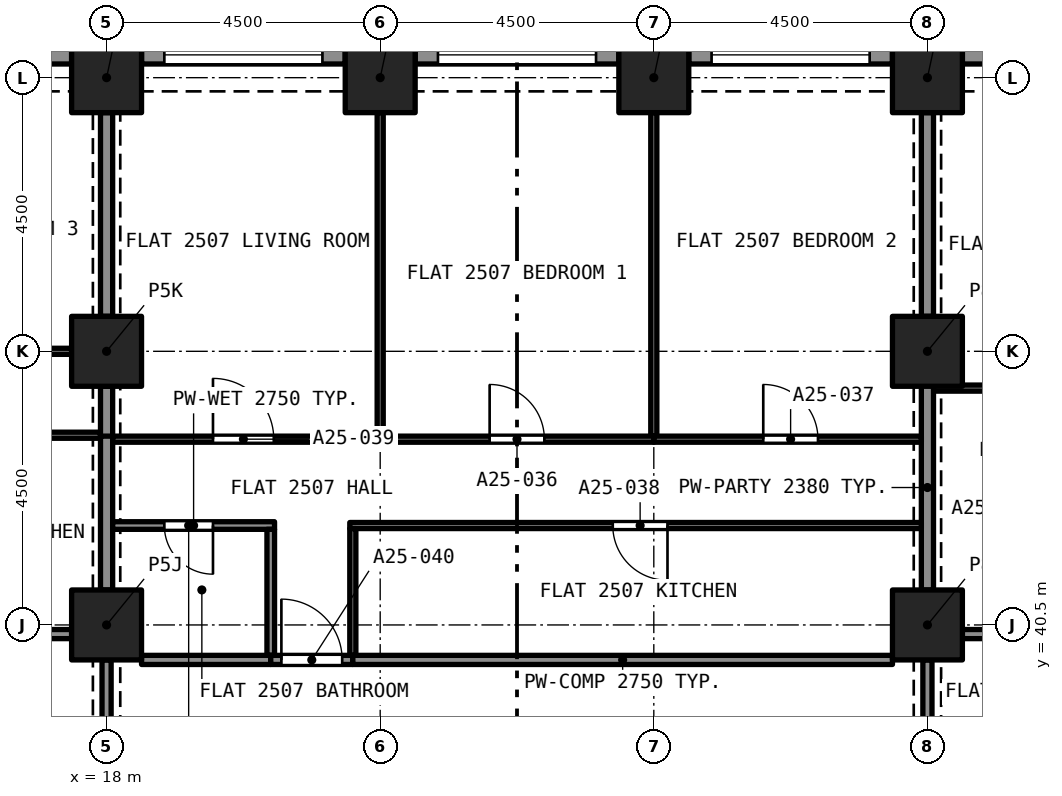
"""IFC4 building model, lengths in metres.
Left out: names, types, materials, properties, quantities, classifications, styles, units other than length and angle.
Written with IfcOpenShell. Run it as: python <this file> out.ifc"""

import sys

from ifc_helpers import new_model, si_unit, direction, frame, frame_2d, origin, origin_2d, place, context, subcontext, project, spatial, rectangle, extrude, element, fill, save


model = new_model("IFC4")
c1 = context("Model", 3, precision=1e-05, world=origin(), true_north=direction((0.0, 1.0)))
c2 = subcontext(c1, "Body", "Model", "MODEL_VIEW")
j1 = project(units=[si_unit("LENGTHUNIT", "METRE"), si_unit("PLANEANGLEUNIT", "RADIAN")], contexts=[c1])
p1 = place(None, origin())
s1 = spatial("IfcSite", under=j1, at=p1, CompositionType="ELEMENT")
p2 = place(p1, origin())
s2 = spatial("IfcBuilding", under=s1, at=p2, CompositionType="ELEMENT")
p3 = place(p2, frame((0.0, 0.0, 92.8)))
s3 = spatial("IfcBuildingStorey", under=s2, at=p3, CompositionType="ELEMENT", Elevation=92.8)
for number, where, z_axis, x_axis in (
    (1, (18.0, 40.5, 0.0), (0.0, 0.0, 1.0), (1.0, 0.0, 0.0)),
    (2, (31.5, 40.5, 0.0), (0.0, 0.0, 1.0), (1.0, 0.0, 0.0)),
    (3, (18.0, 45.0, 0.0), (0.0, 0.0, 1.0), (1.0, 0.0, 0.0)),
    (4, (31.5, 45.0, 0.0), (0.0, 0.0, 1.0), (1.0, 0.0, 0.0)),
    (5, (18.0, 49.5, 0.0), (0.0, 0.0, 1.0), (1.0, 0.0, 0.0)),
    (6, (22.5, 49.5, 0.0), (0.0, 0.0, 1.0), (1.0, 0.0, 0.0)),
    (7, (27.0, 49.5, 0.0), (0.0, 0.0, 1.0), (1.0, 0.0, 0.0)),
    (8, (31.5, 49.5, 0.0), (0.0, 0.0, 1.0), (1.0, 0.0, 0.0)),
):
    element("IfcColumn", number, at=place(p3, frame(where, z_axis=z_axis, x_axis=x_axis)), inside=s3, PredefinedType="COLUMN", context=c2, shape_type="SweptSolid", body=[
        extrude(rectangle(XDim=1.15, YDim=1.15, at=origin_2d()), origin(), (0.0, 0.0, 1.0), 3.2),
    ])
p4 = place(p3, frame((32.075, 49.875, 0.0), z_axis=(0.0, 0.0, 1.0), x_axis=(1.0, 0.0, 0.0)))
e9 = element("IfcWall", 9, at=p4, inside=s3, PredefinedType="SOLIDWALL", context=c2, shape_type="SweptSolid", body=[
    extrude(rectangle(XDim=3.35, YDim=0.3, at=frame_2d((1.675, 0.0))), origin(), (0.0, 0.0, 1.0), 3.2),
])
p5 = place(p4, frame((0.375, 0.0, 0.45)))
e10 = element("IfcOpeningElement", 10, at=p5, cuts=e9, PredefinedType="OPENING", context=c2, shape_type="SweptSolid", body=[
    extrude(rectangle(XDim=2.6, YDim=1.95, at=frame_2d((1.3, 0.975))), frame((0.0, 0.16, 0.0), z_axis=(0.0, -1.0, 0.0), x_axis=(1.0, 0.0, 0.0)), (0.0, 0.0, 1.0), 0.32),
])
p6 = place(p3, frame((27.575, 49.875, 0.0), z_axis=(0.0, 0.0, 1.0), x_axis=(1.0, 0.0, 0.0)))
e11 = element("IfcWall", 11, at=p6, inside=s3, PredefinedType="SOLIDWALL", context=c2, shape_type="SweptSolid", body=[
    extrude(rectangle(XDim=3.35, YDim=0.3, at=frame_2d((1.675, 0.0))), origin(), (0.0, 0.0, 1.0), 3.2),
])
p7 = place(p6, frame((0.375, 0.0, 0.45)))
e12 = element("IfcOpeningElement", 12, at=p7, cuts=e11, PredefinedType="OPENING", context=c2, shape_type="SweptSolid", body=[
    extrude(rectangle(XDim=2.6, YDim=1.95, at=frame_2d((1.3, 0.975))), frame((0.0, 0.16, 0.0), z_axis=(0.0, -1.0, 0.0), x_axis=(1.0, 0.0, 0.0)), (0.0, 0.0, 1.0), 0.32),
])
p8 = place(p3, frame((23.075, 49.875, 0.0), z_axis=(0.0, 0.0, 1.0), x_axis=(1.0, 0.0, 0.0)))
e13 = element("IfcWall", 13, at=p8, inside=s3, PredefinedType="SOLIDWALL", context=c2, shape_type="SweptSolid", body=[
    extrude(rectangle(XDim=3.35, YDim=0.3, at=frame_2d((1.675, 0.0))), origin(), (0.0, 0.0, 1.0), 3.2),
])
p9 = place(p8, frame((0.375, 0.0, 0.45)))
e14 = element("IfcOpeningElement", 14, at=p9, cuts=e13, PredefinedType="OPENING", context=c2, shape_type="SweptSolid", body=[
    extrude(rectangle(XDim=2.6, YDim=1.95, at=frame_2d((1.3, 0.975))), frame((0.0, 0.16, 0.0), z_axis=(0.0, -1.0, 0.0), x_axis=(1.0, 0.0, 0.0)), (0.0, 0.0, 1.0), 0.32),
])
p10 = place(p3, frame((18.575, 49.875, 0.0), z_axis=(0.0, 0.0, 1.0), x_axis=(1.0, 0.0, 0.0)))
e15 = element("IfcWall", 15, at=p10, inside=s3, PredefinedType="SOLIDWALL", context=c2, shape_type="SweptSolid", body=[
    extrude(rectangle(XDim=3.35, YDim=0.3, at=frame_2d((1.675, 0.0))), origin(), (0.0, 0.0, 1.0), 3.2),
])
p11 = place(p10, frame((0.375, 0.0, 0.45)))
e16 = element("IfcOpeningElement", 16, at=p11, cuts=e15, PredefinedType="OPENING", context=c2, shape_type="SweptSolid", body=[
    extrude(rectangle(XDim=2.6, YDim=1.95, at=frame_2d((1.3, 0.975))), frame((0.0, 0.16, 0.0), z_axis=(0.0, -1.0, 0.0), x_axis=(1.0, 0.0, 0.0)), (0.0, 0.0, 1.0), 0.32),
])
p12 = place(p3, frame((14.075, 49.875, 0.0), z_axis=(0.0, 0.0, 1.0), x_axis=(1.0, 0.0, 0.0)))
e17 = element("IfcWall", 17, at=p12, inside=s3, PredefinedType="SOLIDWALL", context=c2, shape_type="SweptSolid", body=[
    extrude(rectangle(XDim=3.35, YDim=0.3, at=frame_2d((1.675, 0.0))), origin(), (0.0, 0.0, 1.0), 3.2),
])
p13 = place(p12, frame((0.375, 0.0, 0.45)))
e18 = element("IfcOpeningElement", 18, at=p13, cuts=e17, PredefinedType="OPENING", context=c2, shape_type="SweptSolid", body=[
    extrude(rectangle(XDim=2.6, YDim=1.95, at=frame_2d((1.3, 0.975))), frame((0.0, 0.16, 0.0), z_axis=(0.0, -1.0, 0.0), x_axis=(1.0, 0.0, 0.0)), (0.0, 0.0, 1.0), 0.32),
])
p14 = place(p3, frame((13.5, 45.0, 0.0), z_axis=(0.0, 0.0, 1.0), x_axis=(1.0, 0.0, 0.0)))
e19 = element("IfcWall", 19, at=p14, inside=s3, PredefinedType="PARTITIONING", context=c2, shape_type="SweptSolid", body=[
    extrude(rectangle(XDim=3.925, YDim=0.1, at=frame_2d((1.962, 0.0))), origin(), (0.0, 0.0, 1.0), 2.9),
])
p15 = place(p14, frame((1.8, 0.0, 0.0)))
e20 = element("IfcOpeningElement", 20, at=p15, cuts=e19, PredefinedType="OPENING", context=c2, shape_type="SweptSolid", body=[
    extrude(rectangle(XDim=0.9, YDim=2.1, at=frame_2d((0.45, 1.05))), frame((0.0, 0.06, 0.0), z_axis=(0.0, -1.0, 0.0), x_axis=(1.0, 0.0, 0.0)), (0.0, 0.0, 1.0), 0.12),
])
p16 = place(p3, frame((18.0, 45.575, 0.0), z_axis=(0.0, 0.0, 1.0), x_axis=(0.0, 1.0, 0.0)))
e21 = element("IfcWall", 21, at=p16, inside=s3, PredefinedType="PARTITIONING", context=c2, shape_type="SweptSolid", body=[
    extrude(rectangle(XDim=3.35, YDim=0.2, at=frame_2d((1.675, 0.0))), origin(), (0.0, 0.0, 1.0), 2.38),
])
p17 = place(p3, frame((17.9, 43.62, 0.0), z_axis=(0.0, 0.0, 1.0), x_axis=(-1.0, 0.0, 0.0)))
e22 = element("IfcWall", 22, at=p17, inside=s3, PredefinedType="PARTITIONING", context=c2, shape_type="SweptSolid", body=[
    extrude(rectangle(XDim=6.172, YDim=0.1, at=frame_2d((3.086, 0.0))), origin(), (0.0, 0.0, 1.0), 2.9),
])
p18 = place(p17, frame((2.586, 0.0, 0.0)))
e23 = element("IfcOpeningElement", 23, at=p18, cuts=e22, PredefinedType="OPENING", context=c2, shape_type="SweptSolid", body=[
    extrude(rectangle(XDim=0.9, YDim=2.1, at=frame_2d((0.45, 1.05))), frame((0.0, 0.06, 0.0), z_axis=(0.0, -1.0, 0.0), x_axis=(1.0, 0.0, 0.0)), (0.0, 0.0, 1.0), 0.12),
])
p19 = place(p3, frame((18.0, 43.57, 0.0), z_axis=(0.0, 0.0, 1.0), x_axis=(0.0, 1.0, 0.0)))
e24 = element("IfcWall", 24, at=p19, inside=s3, PredefinedType="PARTITIONING", context=c2, shape_type="SweptSolid", body=[
    extrude(rectangle(XDim=0.855, YDim=0.2, at=frame_2d((0.427, 0.0))), origin(), (0.0, 0.0, 1.0), 2.38),
])
p20 = place(p3, frame((18.0, 41.075, 0.0), z_axis=(0.0, 0.0, 1.0), x_axis=(0.0, 1.0, 0.0)))
e25 = element("IfcWall", 25, at=p20, inside=s3, PredefinedType="PARTITIONING", context=c2, shape_type="SweptSolid", body=[
    extrude(rectangle(XDim=2.53, YDim=0.2, at=frame_2d((1.265, 0.0))), origin(), (0.0, 0.0, 1.0), 2.38),
])
p21 = place(p3, frame((13.35, 40.35, 0.0), z_axis=(0.0, 0.0, 1.0), x_axis=(1.0, 0.0, 0.0)))
e26 = element("IfcWall", 26, at=p21, inside=s3, PredefinedType="PARTITIONING", context=c2, shape_type="SweptSolid", body=[
    extrude(rectangle(XDim=4.075, YDim=0.15, at=frame_2d((2.038, 0.0))), origin(), (0.0, 0.0, 1.0), 2.9),
])
p22 = place(p3, frame((31.6, 44.395, 0.0), z_axis=(0.0, 0.0, 1.0), x_axis=(1.0, 0.0, 0.0)))
e27 = element("IfcWall", 27, at=p22, inside=s3, PredefinedType="PARTITIONING", context=c2, shape_type="SweptSolid", body=[
    extrude(rectangle(XDim=4.4, YDim=0.1, at=frame_2d((2.2, 0.0))), origin(), (0.0, 0.0, 1.0), 2.9),
])
p23 = place(p22, frame((1.65, 0.0, 0.0)))
e28 = element("IfcOpeningElement", 28, at=p23, cuts=e27, PredefinedType="OPENING", context=c2, shape_type="SweptSolid", body=[
    extrude(rectangle(XDim=1.0, YDim=2.1, at=frame_2d((0.5, 1.05))), frame((0.0, 0.06, 0.0), z_axis=(0.0, -1.0, 0.0), x_axis=(1.0, 0.0, 0.0)), (0.0, 0.0, 1.0), 0.12),
])
p24 = place(p3, frame((31.5, 41.075, 0.0), z_axis=(0.0, 0.0, 1.0), x_axis=(0.0, 1.0, 0.0)))
e29 = element("IfcWall", 29, at=p24, inside=s3, PredefinedType="PARTITIONING", context=c2, shape_type="SweptSolid", body=[
    extrude(rectangle(XDim=3.37, YDim=0.2, at=frame_2d((1.685, 0.0))), origin(), (0.0, 0.0, 1.0), 2.38),
])
p25 = place(p3, frame((32.075, 40.35, 0.0), z_axis=(0.0, 0.0, 1.0), x_axis=(1.0, 0.0, 0.0)))
e30 = element("IfcWall", 30, at=p25, inside=s3, PredefinedType="PARTITIONING", context=c2, shape_type="SweptSolid", body=[
    extrude(rectangle(XDim=2.35, YDim=0.15, at=frame_2d((1.175, 0.0))), origin(), (0.0, 0.0, 1.0), 2.9),
])
p26 = place(p25, frame((1.175, 0.0, 0.0)))
e31 = element("IfcOpeningElement", 31, at=p26, cuts=e30, PredefinedType="OPENING", context=c2, shape_type="SweptSolid", body=[
    extrude(rectangle(XDim=1.0, YDim=2.1, at=frame_2d((0.5, 1.05))), frame((0.0, 0.085, 0.0), z_axis=(0.0, -1.0, 0.0), x_axis=(1.0, 0.0, 0.0)), (0.0, 0.0, 1.0), 0.17),
])
p27 = place(p3, frame((31.5, 45.575, 0.0), z_axis=(0.0, 0.0, 1.0), x_axis=(0.0, 1.0, 0.0)))
e32 = element("IfcWall", 32, at=p27, inside=s3, PredefinedType="PARTITIONING", context=c2, shape_type="SweptSolid", body=[
    extrude(rectangle(XDim=3.35, YDim=0.2, at=frame_2d((1.675, 0.0))), origin(), (0.0, 0.0, 1.0), 2.38),
])
p28 = place(p3, frame((20.762, 42.135, 0.0), z_axis=(0.0, 0.0, 1.0), x_axis=(-1.0, 0.0, 0.0)))
e33 = element("IfcWall", 33, at=p28, inside=s3, PredefinedType="PARTITIONING", context=c2, shape_type="SweptSolid", body=[
    extrude(rectangle(XDim=2.662, YDim=0.125, at=frame_2d((1.331, 0.0))), origin(), (0.0, 0.0, 1.0), 2.75),
])
p29 = place(p28, frame((1.012, 0.0, 0.0)))
e34 = element("IfcOpeningElement", 34, at=p29, cuts=e33, PredefinedType="OPENING", context=c2, shape_type="SweptSolid", body=[
    extrude(rectangle(XDim=0.8, YDim=2.1, at=frame_2d((0.4, 1.05))), frame((0.0, 0.073, 0.0), z_axis=(0.0, -1.0, 0.0), x_axis=(1.0, 0.0, 0.0)), (0.0, 0.0, 1.0), 0.145),
])
p30 = place(p3, frame((20.7, 40.0, 0.0), z_axis=(0.0, 0.0, 1.0), x_axis=(0.0, 1.0, 0.0)))
e35 = element("IfcWall", 35, at=p30, inside=s3, PredefinedType="PARTITIONING", context=c2, shape_type="SweptSolid", body=[
    extrude(rectangle(XDim=2.073, YDim=0.125, at=frame_2d((1.036, 0.0))), origin(), (0.0, 0.0, 1.0), 2.75),
])
p31 = place(p3, frame((18.575, 39.925, 0.0), z_axis=(0.0, 0.0, 1.0), x_axis=(1.0, 0.0, 0.0)))
e36 = element("IfcWall", 36, at=p31, inside=s3, PredefinedType="PARTITIONING", context=c2, shape_type="SweptSolid", body=[
    extrude(rectangle(XDim=2.125, YDim=0.15, at=frame_2d((1.062, 0.0))), origin(), (0.0, 0.0, 1.0), 2.75),
])
p32 = place(p3, frame((27.0, 43.605, 0.0), z_axis=(0.0, 0.0, 1.0), x_axis=(0.0, 1.0, 0.0)))
e37 = element("IfcWall", 37, at=p32, inside=s3, PredefinedType="PARTITIONING", context=c2, shape_type="SweptSolid", body=[
    extrude(rectangle(XDim=5.32, YDim=0.1, at=frame_2d((2.66, 0.0))), origin(), (0.0, 0.0, 1.0), 2.75),
])
p33 = place(p3, frame((22.5, 43.555, 0.0), z_axis=(0.0, 0.0, 1.0), x_axis=(1.0, 0.0, 0.0)))
e38 = element("IfcWall", 38, at=p33, inside=s3, PredefinedType="PARTITIONING", context=c2, shape_type="SweptSolid", body=[
    extrude(rectangle(XDim=4.5, YDim=0.1, at=frame_2d((2.25, 0.0))), origin(), (0.0, 0.0, 1.0), 2.75),
])
p34 = place(p33, frame((1.8, 0.0, 0.0)))
e39 = element("IfcOpeningElement", 39, at=p34, cuts=e38, PredefinedType="OPENING", context=c2, shape_type="SweptSolid", body=[
    extrude(rectangle(XDim=0.9, YDim=2.1, at=frame_2d((0.45, 1.05))), frame((0.0, 0.06, 0.0), z_axis=(0.0, -1.0, 0.0), x_axis=(1.0, 0.0, 0.0)), (0.0, 0.0, 1.0), 0.12),
])
p35 = place(p3, frame((22.5, 43.605, 0.0), z_axis=(0.0, 0.0, 1.0), x_axis=(0.0, 1.0, 0.0)))
e40 = element("IfcWall", 40, at=p35, inside=s3, PredefinedType="PARTITIONING", context=c2, shape_type="SweptSolid", body=[
    extrude(rectangle(XDim=5.32, YDim=0.1, at=frame_2d((2.66, 0.0))), origin(), (0.0, 0.0, 1.0), 2.75),
])
p36 = place(p3, frame((27.0, 43.555, 0.0), z_axis=(0.0, 0.0, 1.0), x_axis=(1.0, 0.0, 0.0)))
e41 = element("IfcWall", 41, at=p36, inside=s3, PredefinedType="PARTITIONING", context=c2, shape_type="SweptSolid", body=[
    extrude(rectangle(XDim=4.4, YDim=0.1, at=frame_2d((2.2, 0.0))), origin(), (0.0, 0.0, 1.0), 2.75),
])
p37 = place(p36, frame((1.8, 0.0, 0.0)))
e42 = element("IfcOpeningElement", 42, at=p37, cuts=e41, PredefinedType="OPENING", context=c2, shape_type="SweptSolid", body=[
    extrude(rectangle(XDim=0.9, YDim=2.1, at=frame_2d((0.45, 1.05))), frame((0.0, 0.06, 0.0), z_axis=(0.0, -1.0, 0.0), x_axis=(1.0, 0.0, 0.0)), (0.0, 0.0, 1.0), 0.12),
])
p38 = place(p3, frame((31.4, 42.135, 0.0), z_axis=(0.0, 0.0, 1.0), x_axis=(-1.0, 0.0, 0.0)))
e43 = element("IfcWall", 43, at=p38, inside=s3, PredefinedType="PARTITIONING", context=c2, shape_type="SweptSolid", body=[
    extrude(rectangle(XDim=9.4, YDim=0.1, at=frame_2d((4.7, 0.0))), origin(), (0.0, 0.0, 1.0), 2.75),
])
p39 = place(p38, frame((4.175, 0.0, 0.0)))
e44 = element("IfcOpeningElement", 44, at=p39, cuts=e43, PredefinedType="OPENING", context=c2, shape_type="SweptSolid", body=[
    extrude(rectangle(XDim=0.9, YDim=2.1, at=frame_2d((0.45, 1.05))), frame((0.0, 0.06, 0.0), z_axis=(0.0, -1.0, 0.0), x_axis=(1.0, 0.0, 0.0)), (0.0, 0.0, 1.0), 0.12),
])
p40 = place(p3, frame((22.05, 40.0, 0.0), z_axis=(0.0, 0.0, 1.0), x_axis=(0.0, 1.0, 0.0)))
e45 = element("IfcWall", 45, at=p40, inside=s3, PredefinedType="PARTITIONING", context=c2, shape_type="SweptSolid", body=[
    extrude(rectangle(XDim=2.085, YDim=0.1, at=frame_2d((1.042, 0.0))), origin(), (0.0, 0.0, 1.0), 2.75),
])
p41 = place(p3, frame((18.1, 43.555, 0.0), z_axis=(0.0, 0.0, 1.0), x_axis=(1.0, 0.0, 0.0)))
e46 = element("IfcWall", 46, at=p41, inside=s3, PredefinedType="PARTITIONING", context=c2, shape_type="SweptSolid", body=[
    extrude(rectangle(XDim=4.4, YDim=0.1, at=frame_2d((2.2, 0.0))), origin(), (0.0, 0.0, 1.0), 2.75),
])
p42 = place(p41, frame((1.65, 0.0, 0.0)))
e47 = element("IfcOpeningElement", 47, at=p42, cuts=e46, PredefinedType="OPENING", context=c2, shape_type="SweptSolid", body=[
    extrude(rectangle(XDim=1.0, YDim=2.1, at=frame_2d((0.5, 1.05))), frame((0.0, 0.06, 0.0), z_axis=(0.0, -1.0, 0.0), x_axis=(1.0, 0.0, 0.0)), (0.0, 0.0, 1.0), 0.12),
])
p43 = place(p3, frame((20.7, 39.925, 0.0), z_axis=(0.0, 0.0, 1.0), x_axis=(1.0, 0.0, 0.0)))
e48 = element("IfcWall", 48, at=p43, inside=s3, PredefinedType="PARTITIONING", context=c2, shape_type="SweptSolid", body=[
    extrude(rectangle(XDim=1.35, YDim=0.15, at=frame_2d((0.675, 0.0))), origin(), (0.0, 0.0, 1.0), 2.75),
])
p44 = place(p43, frame((0.175, 0.0, 0.0)))
e49 = element("IfcOpeningElement", 49, at=p44, cuts=e48, PredefinedType="OPENING", context=c2, shape_type="SweptSolid", body=[
    extrude(rectangle(XDim=1.0, YDim=2.1, at=frame_2d((0.5, 1.05))), frame((0.0, 0.085, 0.0), z_axis=(0.0, -1.0, 0.0), x_axis=(1.0, 0.0, 0.0)), (0.0, 0.0, 1.0), 0.17),
])
p45 = place(p3, frame((22.05, 39.925, 0.0), z_axis=(0.0, 0.0, 1.0), x_axis=(1.0, 0.0, 0.0)))
e50 = element("IfcWall", 50, at=p45, inside=s3, PredefinedType="PARTITIONING", context=c2, shape_type="SweptSolid", body=[
    extrude(rectangle(XDim=8.875, YDim=0.15, at=frame_2d((4.438, 0.0))), origin(), (0.0, 0.0, 1.0), 2.75),
])
p46 = place(p3, frame((31.5, 36.575, 0.0), z_axis=(0.0, 0.0, 1.0), x_axis=(0.0, 1.0, 0.0)))
e51 = element("IfcWall", 51, at=p46, inside=s3, PredefinedType="PARTITIONING", context=c2, shape_type="SweptSolid", body=[
    extrude(rectangle(XDim=3.35, YDim=0.15, at=frame_2d((1.675, 0.0))), origin(), (0.0, 0.0, 1.0), 2.38),
])
p47 = place(p46, frame((1.075, 0.0, 0.0)))
e52 = element("IfcOpeningElement", 52, at=p47, cuts=e51, PredefinedType="OPENING", context=c2, shape_type="SweptSolid", body=[
    extrude(rectangle(XDim=1.2, YDim=2.1, at=frame_2d((0.6, 1.05))), frame((0.0, 0.085, 0.0), z_axis=(0.0, -1.0, 0.0), x_axis=(1.0, 0.0, 0.0)), (0.0, 0.0, 1.0), 0.17),
])
p48 = place(p3, frame((18.0, 39.925, 0.0), z_axis=(0.0, 0.0, 1.0), x_axis=(0.0, -1.0, 0.0)))
e53 = element("IfcWall", 53, at=p48, inside=s3, PredefinedType="PARTITIONING", context=c2, shape_type="SweptSolid", body=[
    extrude(rectangle(XDim=3.35, YDim=0.15, at=frame_2d((1.675, 0.0))), origin(), (0.0, 0.0, 1.0), 2.38),
])
p49 = place(p48, frame((1.075, 0.0, 0.0)))
e54 = element("IfcOpeningElement", 54, at=p49, cuts=e53, PredefinedType="OPENING", context=c2, shape_type="SweptSolid", body=[
    extrude(rectangle(XDim=1.2, YDim=2.1, at=frame_2d((0.6, 1.05))), frame((0.0, 0.085, 0.0), z_axis=(0.0, -1.0, 0.0), x_axis=(1.0, 0.0, 0.0)), (0.0, 0.0, 1.0), 0.17),
])
p50 = place(p7, origin())
e55 = element("IfcWindow", 55, at=p50, inside=s3, PartitioningType="SINGLE_PANEL", PredefinedType="WINDOW", context=c2, shape_type="SweptSolid", body=[
    extrude(rectangle(XDim=2.6, YDim=1.95, at=frame_2d((1.3, 0.975))), frame((0.0, 0.03, 0.0), z_axis=(0.0, -1.0, 0.0), x_axis=(1.0, 0.0, 0.0)), (0.0, 0.0, 1.0), 0.06),
])
fill(e12, e55)
p51 = place(p9, origin())
e56 = element("IfcWindow", 56, at=p51, inside=s3, PartitioningType="SINGLE_PANEL", PredefinedType="WINDOW", context=c2, shape_type="SweptSolid", body=[
    extrude(rectangle(XDim=2.6, YDim=1.95, at=frame_2d((1.3, 0.975))), frame((0.0, 0.03, 0.0), z_axis=(0.0, -1.0, 0.0), x_axis=(1.0, 0.0, 0.0)), (0.0, 0.0, 1.0), 0.06),
])
fill(e14, e56)
p52 = place(p11, origin())
e57 = element("IfcWindow", 57, at=p52, inside=s3, PartitioningType="SINGLE_PANEL", PredefinedType="WINDOW", context=c2, shape_type="SweptSolid", body=[
    extrude(rectangle(XDim=2.6, YDim=1.95, at=frame_2d((1.3, 0.975))), frame((0.0, 0.03, 0.0), z_axis=(0.0, -1.0, 0.0), x_axis=(1.0, 0.0, 0.0)), (0.0, 0.0, 1.0), 0.06),
])
fill(e16, e57)
p53 = place(p29, origin())
e58 = element("IfcDoor", 58, at=p53, inside=s3, OperationType="SINGLE_SWING_RIGHT", PredefinedType="DOOR", context=c2, shape_type="SweptSolid", body=[
    extrude(rectangle(XDim=0.8, YDim=2.1, at=frame_2d((0.4, 1.05))), frame((0.0, 0.025, 0.0), z_axis=(0.0, -1.0, 0.0), x_axis=(1.0, 0.0, 0.0)), (0.0, 0.0, 1.0), 0.05),
])
fill(e34, e58)
p54 = place(p34, origin())
e59 = element("IfcDoor", 59, at=p54, inside=s3, OperationType="SINGLE_SWING_LEFT", PredefinedType="DOOR", context=c2, shape_type="SweptSolid", body=[
    extrude(rectangle(XDim=0.9, YDim=2.1, at=frame_2d((0.45, 1.05))), frame((0.0, 0.025, 0.0), z_axis=(0.0, -1.0, 0.0), x_axis=(1.0, 0.0, 0.0)), (0.0, 0.0, 1.0), 0.05),
])
fill(e39, e59)
p55 = place(p37, origin())
e60 = element("IfcDoor", 60, at=p55, inside=s3, OperationType="SINGLE_SWING_RIGHT", PredefinedType="DOOR", context=c2, shape_type="SweptSolid", body=[
    extrude(rectangle(XDim=0.9, YDim=2.1, at=frame_2d((0.45, 1.05))), frame((0.0, 0.025, 0.0), z_axis=(0.0, -1.0, 0.0), x_axis=(1.0, 0.0, 0.0)), (0.0, 0.0, 1.0), 0.05),
])
fill(e42, e60)
p56 = place(p39, origin())
e61 = element("IfcDoor", 61, at=p56, inside=s3, OperationType="SINGLE_SWING_LEFT", PredefinedType="DOOR", context=c2, shape_type="SweptSolid", body=[
    extrude(rectangle(XDim=0.9, YDim=2.1, at=frame_2d((0.45, 1.05))), frame((0.0, 0.025, 0.0), z_axis=(0.0, -1.0, 0.0), x_axis=(1.0, 0.0, 0.0)), (0.0, 0.0, 1.0), 0.05),
])
fill(e44, e61)
p57 = place(p42, origin())
e62 = element("IfcDoor", 62, at=p57, inside=s3, OperationType="SINGLE_SWING_LEFT", PredefinedType="DOOR", context=c2, shape_type="SweptSolid", body=[
    extrude(rectangle(XDim=1.0, YDim=2.1, at=frame_2d((0.5, 1.05))), frame((0.0, 0.025, 0.0), z_axis=(0.0, -1.0, 0.0), x_axis=(1.0, 0.0, 0.0)), (0.0, 0.0, 1.0), 0.05),
])
fill(e47, e62)
p58 = place(p44, origin())
e63 = element("IfcDoor", 63, at=p58, inside=s3, OperationType="SINGLE_SWING_RIGHT", PredefinedType="DOOR", context=c2, shape_type="SweptSolid", body=[
    extrude(rectangle(XDim=1.0, YDim=2.1, at=frame_2d((0.5, 1.05))), frame((0.0, 0.025, 0.0), z_axis=(0.0, -1.0, 0.0), x_axis=(1.0, 0.0, 0.0)), (0.0, 0.0, 1.0), 0.05),
])
fill(e49, e63)
save(model, sys.argv[1])
